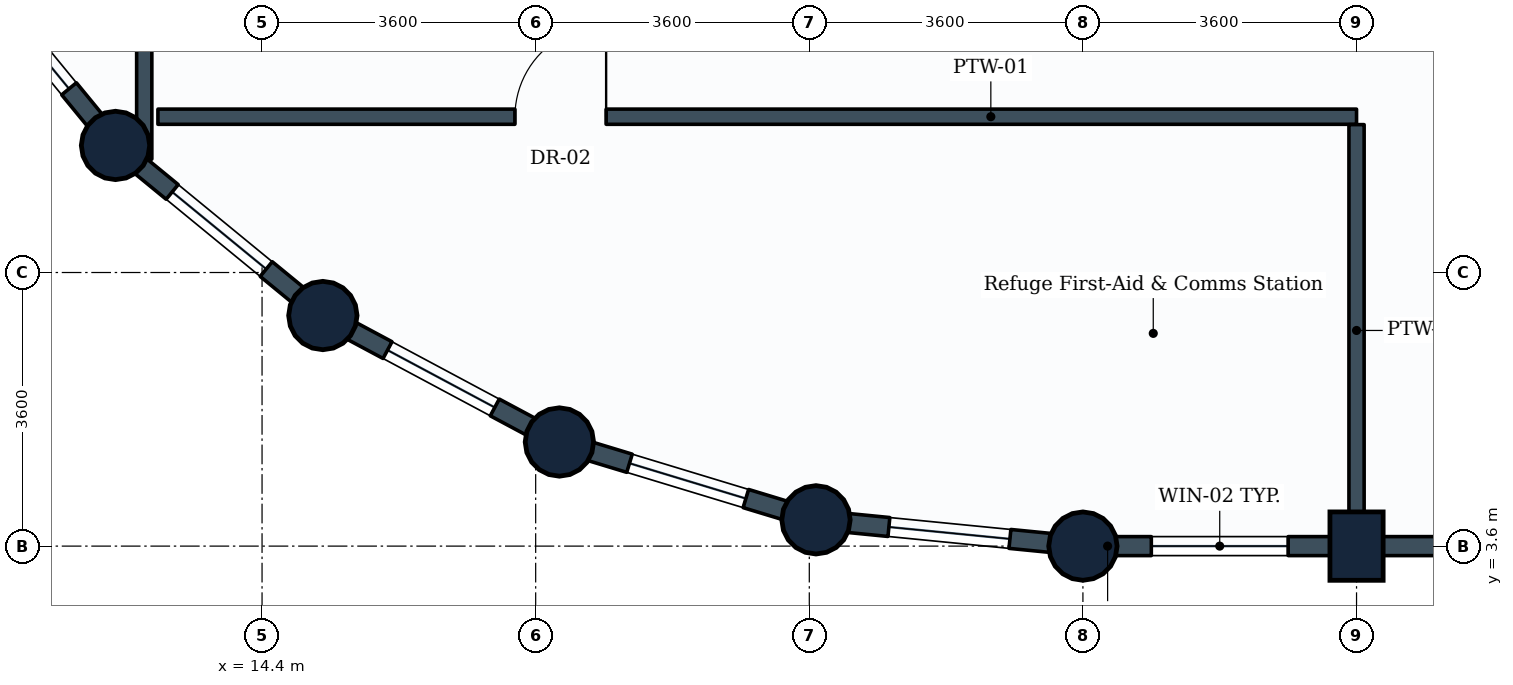
"""IFC4 building model, lengths in metres.
Left out: names, types, materials, properties, quantities, classifications, styles, units other than length and angle.
Written with IfcOpenShell. Run it as: python <this file> out.ifc"""

import sys

from ifc_helpers import new_model, si_unit, direction, frame, frame_2d, origin, origin_2d, place, context, subcontext, project, spatial, rectangle, circle, extrude, element, fill, save


model = new_model("IFC4")
c1 = context("Model", 3, precision=1e-05, world=origin(), true_north=direction((0.0, 1.0)))
c2 = subcontext(c1, "Body", "Model", "MODEL_VIEW")
j1 = project(units=[si_unit("LENGTHUNIT", "METRE"), si_unit("PLANEANGLEUNIT", "RADIAN")], contexts=[c1])
p1 = place(None, origin())
s1 = spatial("IfcSite", under=j1, at=p1, CompositionType="ELEMENT")
p2 = place(p1, origin())
s2 = spatial("IfcBuilding", under=s1, at=p2, CompositionType="ELEMENT")
p3 = place(p2, frame((0.0, 0.0, 213.8)))
s3 = spatial("IfcBuildingStorey", under=s2, at=p3, CompositionType="ELEMENT", Elevation=213.8)
for number, where, z_axis, x_axis in (
    (1, (12.472, 8.872, 0.0), (0.0, 0.0, 1.0), (1.0, 0.0, 0.0)),
    (2, (15.2, 6.634, 0.0), (0.0, 0.0, 1.0), (1.0, 0.0, 0.0)),
    (3, (18.312, 4.97, 0.0), (0.0, 0.0, 1.0), (1.0, 0.0, 0.0)),
    (4, (21.688, 3.946, 0.0), (0.0, 0.0, 1.0), (1.0, 0.0, 0.0)),
    (5, (25.2, 3.6, 0.0), (0.0, 0.0, 1.0), (1.0, 0.0, 0.0)),
):
    element("IfcColumn", number, at=place(p3, frame(where, z_axis=z_axis, x_axis=x_axis)), inside=s3, PredefinedType="COLUMN", context=c2, shape_type="SweptSolid", body=[
        extrude(circle(Radius=0.45, at=origin_2d()), origin(), (0.0, 0.0, 1.0), 3.6),
    ])
p4 = place(p3, frame((28.8, 3.6, 0.0), z_axis=(0.0, 0.0, 1.0), x_axis=(1.0, 0.0, 0.0)))
e6 = element("IfcColumn", 6, at=p4, inside=s3, PredefinedType="COLUMN", context=c2, shape_type="SweptSolid", body=[
    extrude(rectangle(XDim=0.7, YDim=0.9, at=origin_2d()), origin(), (0.0, 0.0, 1.0), 3.6),
])
p5 = place(p3, frame((28.8, 3.6, 0.0), z_axis=(0.0, 0.0, 1.0), x_axis=(-1.0, 0.0, 0.0)))
e7 = element("IfcWall", 7, at=p5, inside=s3, PredefinedType="STANDARD", context=c2, shape_type="SweptSolid", body=[
    extrude(rectangle(XDim=3.6, YDim=0.25, at=frame_2d((1.8, 0.0))), origin(), (0.0, 0.0, 1.0), 2.73),
])
p6 = place(p5, frame((0.9, 0.0, 0.85)))
e8 = element("IfcOpeningElement", 8, at=p6, cuts=e7, PredefinedType="OPENING", context=c2, shape_type="SweptSolid", body=[
    extrude(rectangle(XDim=1.8, YDim=1.35, at=frame_2d((0.9, 0.675))), frame((0.0, 0.135, 0.0), z_axis=(0.0, -1.0, 0.0), x_axis=(1.0, 0.0, 0.0)), (0.0, 0.0, 1.0), 0.27),
])
p7 = place(p3, frame((32.4, 3.6, 0.0), z_axis=(0.0, 0.0, 1.0), x_axis=(-1.0, 0.0, 0.0)))
e9 = element("IfcWall", 9, at=p7, inside=s3, PredefinedType="STANDARD", context=c2, shape_type="SweptSolid", body=[
    extrude(rectangle(XDim=3.6, YDim=0.25, at=frame_2d((1.8, 0.0))), origin(), (0.0, 0.0, 1.0), 2.73),
])
p8 = place(p3, frame((12.472, 8.872, 0.0), z_axis=(0.0, 0.0, 1.0), x_axis=(-0.634258295121, 0.773121216285, 0.0)))
e10 = element("IfcWall", 10, at=p8, inside=s3, PredefinedType="STANDARD", context=c2, shape_type="SweptSolid", body=[
    extrude(rectangle(XDim=3.529, YDim=0.25, at=frame_2d((1.764, 0.0))), origin(), (0.0, 0.0, 1.0), 2.73),
])
p9 = place(p8, frame((0.964, 0.0, 0.85)))
e11 = element("IfcOpeningElement", 11, at=p9, cuts=e10, PredefinedType="OPENING", context=c2, shape_type="SweptSolid", body=[
    extrude(rectangle(XDim=1.6, YDim=1.35, at=frame_2d((0.8, 0.675))), frame((0.0, 0.135, 0.0), z_axis=(0.0, -1.0, 0.0), x_axis=(1.0, 0.0, 0.0)), (0.0, 0.0, 1.0), 0.27),
])
p10 = place(p3, frame((15.2, 6.634, 0.0), z_axis=(0.0, 0.0, 1.0), x_axis=(-0.773121216285, 0.634258295121, 0.0)))
e12 = element("IfcWall", 12, at=p10, inside=s3, PredefinedType="STANDARD", context=c2, shape_type="SweptSolid", body=[
    extrude(rectangle(XDim=3.529, YDim=0.25, at=frame_2d((1.764, 0.0))), origin(), (0.0, 0.0, 1.0), 2.73),
])
p11 = place(p10, frame((0.964, 0.0, 0.85)))
e13 = element("IfcOpeningElement", 13, at=p11, cuts=e12, PredefinedType="OPENING", context=c2, shape_type="SweptSolid", body=[
    extrude(rectangle(XDim=1.6, YDim=1.35, at=frame_2d((0.8, 0.675))), frame((0.0, 0.135, 0.0), z_axis=(0.0, -1.0, 0.0), x_axis=(1.0, 0.0, 0.0)), (0.0, 0.0, 1.0), 0.27),
])
p12 = place(p3, frame((18.312, 4.97, 0.0), z_axis=(0.0, 0.0, 1.0), x_axis=(-0.881846862014, 0.471535907389, 0.0)))
e14 = element("IfcWall", 14, at=p12, inside=s3, PredefinedType="STANDARD", context=c2, shape_type="SweptSolid", body=[
    extrude(rectangle(XDim=3.529, YDim=0.25, at=frame_2d((1.765, 0.0))), origin(), (0.0, 0.0, 1.0), 2.73),
])
p13 = place(p12, frame((0.964, 0.0, 0.85)))
e15 = element("IfcOpeningElement", 15, at=p13, cuts=e14, PredefinedType="OPENING", context=c2, shape_type="SweptSolid", body=[
    extrude(rectangle(XDim=1.6, YDim=1.35, at=frame_2d((0.8, 0.675))), frame((0.0, 0.135, 0.0), z_axis=(0.0, -1.0, 0.0), x_axis=(1.0, 0.0, 0.0)), (0.0, 0.0, 1.0), 0.27),
])
p14 = place(p3, frame((21.688, 3.946, 0.0), z_axis=(0.0, 0.0, 1.0), x_axis=(-0.956953367403, 0.290241714123, 0.0)))
e16 = element("IfcWall", 16, at=p14, inside=s3, PredefinedType="STANDARD", context=c2, shape_type="SweptSolid", body=[
    extrude(rectangle(XDim=3.528, YDim=0.25, at=frame_2d((1.764, 0.0))), origin(), (0.0, 0.0, 1.0), 2.73),
])
p15 = place(p14, frame((0.964, 0.0, 0.85)))
e17 = element("IfcOpeningElement", 17, at=p15, cuts=e16, PredefinedType="OPENING", context=c2, shape_type="SweptSolid", body=[
    extrude(rectangle(XDim=1.6, YDim=1.35, at=frame_2d((0.8, 0.675))), frame((0.0, 0.135, 0.0), z_axis=(0.0, -1.0, 0.0), x_axis=(1.0, 0.0, 0.0)), (0.0, 0.0, 1.0), 0.27),
])
p16 = place(p3, frame((25.2, 3.6, 0.0), z_axis=(0.0, 0.0, 1.0), x_axis=(-0.995183369056, 0.098030923459, 0.0)))
e18 = element("IfcWall", 18, at=p16, inside=s3, PredefinedType="STANDARD", context=c2, shape_type="SweptSolid", body=[
    extrude(rectangle(XDim=3.529, YDim=0.25, at=frame_2d((1.765, 0.0))), origin(), (0.0, 0.0, 1.0), 2.73),
])
p17 = place(p16, frame((0.965, 0.0, 0.85)))
e19 = element("IfcOpeningElement", 19, at=p17, cuts=e18, PredefinedType="OPENING", context=c2, shape_type="SweptSolid", body=[
    extrude(rectangle(XDim=1.6, YDim=1.35, at=frame_2d((0.8, 0.675))), frame((0.0, 0.135, 0.0), z_axis=(0.0, -1.0, 0.0), x_axis=(1.0, 0.0, 0.0)), (0.0, 0.0, 1.0), 0.27),
])
p18 = place(p3, frame((12.85, 8.691, 0.0), z_axis=(0.0, 0.0, 1.0), x_axis=(0.0, 1.0, 0.0)))
e20 = element("IfcWall", 20, at=p18, inside=s3, PredefinedType="PARTITIONING", context=c2, shape_type="SweptSolid", body=[
    extrude(rectangle(XDim=16.509, YDim=0.2, at=frame_2d((8.254, 0.0))), origin(), (0.0, 0.0, 1.0), 2.73),
])
p19 = place(p18, frame((7.59, 0.0, 0.0)))
e21 = element("IfcOpeningElement", 21, at=p19, cuts=e20, PredefinedType="OPENING", context=c2, shape_type="SweptSolid", body=[
    extrude(rectangle(XDim=1.2, YDim=2.1, at=frame_2d((0.6, 1.05))), frame((0.0, 0.11, 0.0), z_axis=(0.0, -1.0, 0.0), x_axis=(1.0, 0.0, 0.0)), (0.0, 0.0, 1.0), 0.22),
])
p20 = place(p3, frame((13.03, 9.25, 0.0), z_axis=(0.0, 0.0, 1.0), x_axis=(1.0, 0.0, 0.0)))
e22 = element("IfcWall", 22, at=p20, inside=s3, PredefinedType="PARTITIONING", context=c2, shape_type="SweptSolid", body=[
    extrude(rectangle(XDim=15.77, YDim=0.2, at=frame_2d((7.885, 0.0))), origin(), (0.0, 0.0, 1.0), 3.02),
])
p21 = place(p20, frame((4.697, 0.0, 0.0)))
e23 = element("IfcOpeningElement", 23, at=p21, cuts=e22, PredefinedType="OPENING", context=c2, shape_type="SweptSolid", body=[
    extrude(rectangle(XDim=1.2, YDim=2.1, at=frame_2d((0.6, 1.05))), frame((0.0, 0.11, 0.0), z_axis=(0.0, -1.0, 0.0), x_axis=(1.0, 0.0, 0.0)), (0.0, 0.0, 1.0), 0.22),
])
p22 = place(p3, frame((28.8, 9.146, 0.0), z_axis=(0.0, 0.0, 1.0), x_axis=(0.0, -1.0, 0.0)))
e24 = element("IfcWall", 24, at=p22, inside=s3, PredefinedType="PARTITIONING", context=c2, shape_type="SweptSolid", body=[
    extrude(rectangle(XDim=5.417, YDim=0.2, at=frame_2d((2.708, 0.0))), origin(), (0.0, 0.0, 1.0), 3.335),
])
p23 = place(p6, origin())
e25 = element("IfcWindow", 25, at=p23, inside=s3, PartitioningType="SINGLE_PANEL", PredefinedType="WINDOW", context=c2, shape_type="SweptSolid", body=[
    extrude(rectangle(XDim=1.8, YDim=1.35, at=frame_2d((0.9, 0.675))), frame((0.0, 0.03, 0.0), z_axis=(0.0, -1.0, 0.0), x_axis=(1.0, 0.0, 0.0)), (0.0, 0.0, 1.0), 0.06),
])
fill(e8, e25)
p24 = place(p9, origin())
e26 = element("IfcWindow", 26, at=p24, inside=s3, PartitioningType="SINGLE_PANEL", PredefinedType="WINDOW", context=c2, shape_type="SweptSolid", body=[
    extrude(rectangle(XDim=1.6, YDim=1.35, at=frame_2d((0.8, 0.675))), frame((0.0, 0.03, 0.0), z_axis=(0.0, -1.0, 0.0), x_axis=(1.0, 0.0, 0.0)), (0.0, 0.0, 1.0), 0.06),
])
fill(e11, e26)
p25 = place(p11, origin())
e27 = element("IfcWindow", 27, at=p25, inside=s3, PartitioningType="SINGLE_PANEL", PredefinedType="WINDOW", context=c2, shape_type="SweptSolid", body=[
    extrude(rectangle(XDim=1.6, YDim=1.35, at=frame_2d((0.8, 0.675))), frame((0.0, 0.03, 0.0), z_axis=(0.0, -1.0, 0.0), x_axis=(1.0, 0.0, 0.0)), (0.0, 0.0, 1.0), 0.06),
])
fill(e13, e27)
p26 = place(p13, origin())
e28 = element("IfcWindow", 28, at=p26, inside=s3, PartitioningType="SINGLE_PANEL", PredefinedType="WINDOW", context=c2, shape_type="SweptSolid", body=[
    extrude(rectangle(XDim=1.6, YDim=1.35, at=frame_2d((0.8, 0.675))), frame((0.0, 0.03, 0.0), z_axis=(0.0, -1.0, 0.0), x_axis=(1.0, 0.0, 0.0)), (0.0, 0.0, 1.0), 0.06),
])
fill(e15, e28)
p27 = place(p15, origin())
e29 = element("IfcWindow", 29, at=p27, inside=s3, PartitioningType="SINGLE_PANEL", PredefinedType="WINDOW", context=c2, shape_type="SweptSolid", body=[
    extrude(rectangle(XDim=1.6, YDim=1.35, at=frame_2d((0.8, 0.675))), frame((0.0, 0.03, 0.0), z_axis=(0.0, -1.0, 0.0), x_axis=(1.0, 0.0, 0.0)), (0.0, 0.0, 1.0), 0.06),
])
fill(e17, e29)
p28 = place(p17, origin())
e30 = element("IfcWindow", 30, at=p28, inside=s3, PartitioningType="SINGLE_PANEL", PredefinedType="WINDOW", context=c2, shape_type="SweptSolid", body=[
    extrude(rectangle(XDim=1.6, YDim=1.35, at=frame_2d((0.8, 0.675))), frame((0.0, 0.03, 0.0), z_axis=(0.0, -1.0, 0.0), x_axis=(1.0, 0.0, 0.0)), (0.0, 0.0, 1.0), 0.06),
])
fill(e19, e30)
p29 = place(p21, origin())
e31 = element("IfcDoor", 31, at=p29, inside=s3, OperationType="SINGLE_SWING_RIGHT", PredefinedType="DOOR", context=c2, shape_type="SweptSolid", body=[
    extrude(rectangle(XDim=1.2, YDim=2.1, at=frame_2d((0.6, 1.05))), frame((0.0, 0.025, 0.0), z_axis=(0.0, -1.0, 0.0), x_axis=(1.0, 0.0, 0.0)), (0.0, 0.0, 1.0), 0.05),
])
fill(e23, e31)
save(model, sys.argv[1])
